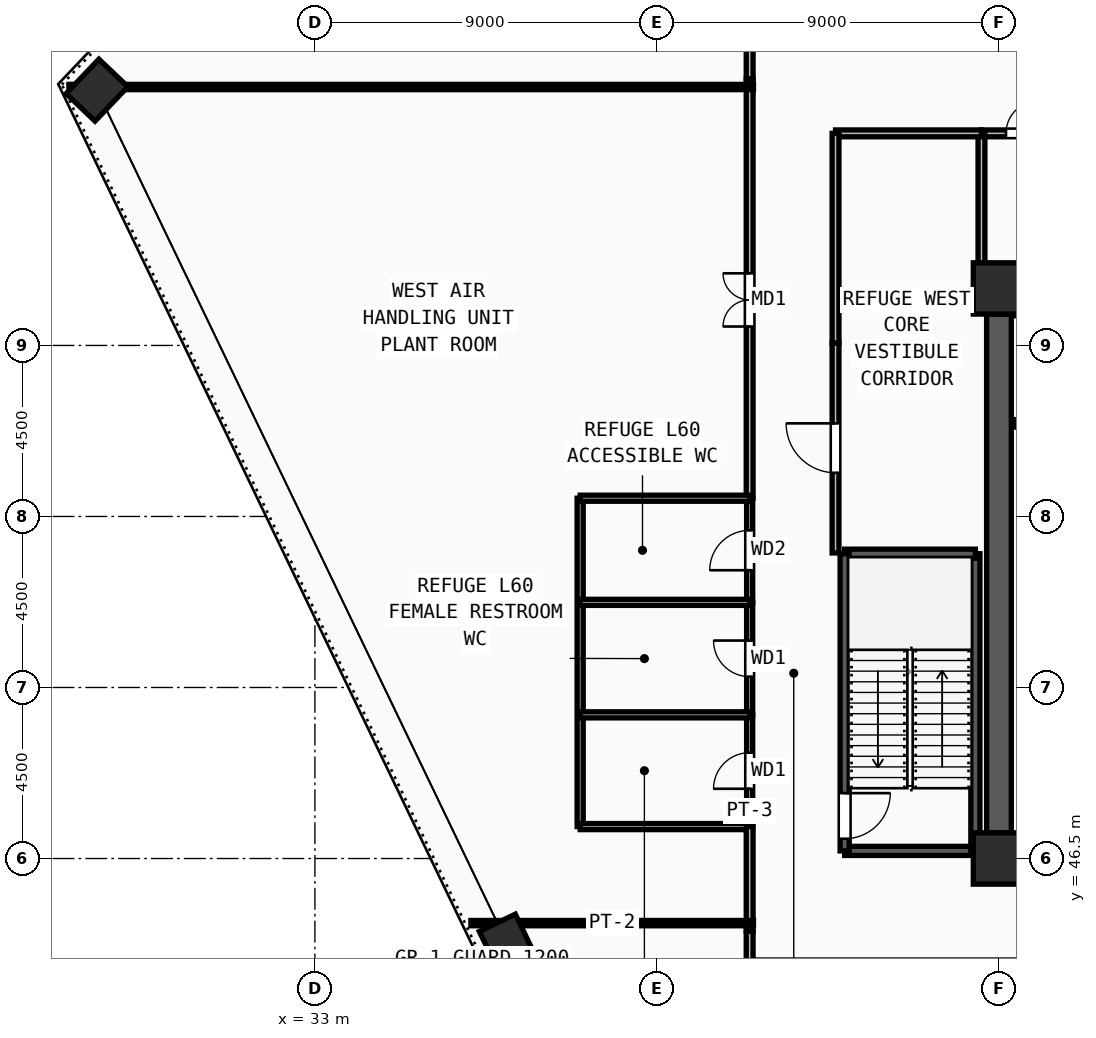
"""IFC4 building model, lengths in metres.
Left out: names, types, materials, properties, quantities, classifications, styles, units other than length and angle.
Written with IfcOpenShell. Run it as: python <this file> out.ifc"""

import sys

from ifc_helpers import new_model, si_unit, direction, frame, frame_2d, origin, origin_2d, place, context, subcontext, project, spatial, rectangle, extrude, source, transform, mapped, element, fill, save


model = new_model("IFC4")
c1 = context("Model", 3, precision=1e-05, world=origin(), true_north=direction((0.0, 1.0)))
c2 = subcontext(c1, "Body", "Model", "MODEL_VIEW")
j1 = project(units=[si_unit("LENGTHUNIT", "METRE"), si_unit("PLANEANGLEUNIT", "RADIAN")], contexts=[c1])
p1 = place(None, origin())
s1 = spatial("IfcSite", under=j1, at=p1, CompositionType="ELEMENT")
p2 = place(p1, origin())
s2 = spatial("IfcBuilding", under=s1, at=p2, CompositionType="ELEMENT")
p3 = place(p2, frame((0.0, 0.0, 231.75)))
s3 = spatial("IfcBuildingStorey", under=s2, at=p3, CompositionType="ELEMENT", Elevation=231.75)
m1 = source(origin(), c2, "Body", "SweptSolid", [
    extrude(rectangle(XDim=1.35, YDim=1.35, at=origin_2d()), origin(), (0.0, 0.0, 1.0), 4.5),
])
for number, where, z_axis, x_axis in (
    (1, (51.0, 46.5, 0.0), (0.0, 0.0, 1.0), (1.0, 0.0, 0.0)),
    (2, (51.0, 61.5, 0.0), (0.0, 0.0, 1.0), (1.0, 0.0, 0.0)),
):
    element("IfcColumn", number, at=place(p3, frame(where, z_axis=z_axis, x_axis=x_axis)), inside=s3, PredefinedType="COLUMN", context=c2, shape_type="MappedRepresentation", body=[
        mapped(m1, transform((0.0, 0.0, 0.0), x_axis=(1.0, 0.0, 0.0), y_axis=(0.0, 1.0, 0.0), z_axis=(0.0, 0.0, 1.0), scale=1.0)),
    ])
m2 = source(origin(), c2, "Body", "SweptSolid", [
    extrude(rectangle(XDim=1.25, YDim=1.05, at=origin_2d()), origin(), (0.0, 0.0, 1.0), 4.5),
])
for number, where, z_axis, x_axis in (
    (3, (38.071, 44.245, 0.0), (0.0, 0.0, 1.0), (-0.433, 0.901, 0.0)),
    (4, (27.265, 66.717, 0.0), (0.0, 0.0, 1.0), (0.689, 0.724, 0.0)),
):
    element("IfcColumn", number, at=place(p3, frame(where, z_axis=z_axis, x_axis=x_axis)), inside=s3, PredefinedType="COLUMN", context=c2, shape_type="MappedRepresentation", body=[
        mapped(m2, transform((0.0, 0.0, 0.0), x_axis=(1.0, 0.0, 0.0), y_axis=(0.0, 1.0, 0.0), z_axis=(0.0, 0.0, 1.0), scale=1.0)),
    ])
p4 = place(p3, frame((51.0, 47.175, 0.0), z_axis=(0.0, 0.0, 1.0), x_axis=(0.0, 1.0, 0.0)))
e5 = element("IfcWall", 5, at=p4, inside=s3, PredefinedType="SHEAR", context=c2, shape_type="SweptSolid", body=[
    extrude(rectangle(XDim=13.65, YDim=0.65, at=frame_2d((6.825, 0.0))), origin(), (0.0, 0.0, 1.0), 4.32),
])
p5 = place(p3, frame((46.94, 46.7, 0.0), z_axis=(0.0, 0.0, 1.0), x_axis=(1.0, 0.0, 0.0)))
e6 = element("IfcWall", 6, at=p5, inside=s3, PredefinedType="SOLIDWALL", context=c2, shape_type="SweptSolid", body=[
    extrude(rectangle(XDim=3.44, YDim=0.24, at=frame_2d((1.72, 0.0))), origin(), (0.0, 0.0, 1.0), 4.32),
])
p6 = place(p3, frame((50.38, 46.7, 0.0), z_axis=(0.0, 0.0, 1.0), x_axis=(0.0, 1.0, 0.0)))
e7 = element("IfcWall", 7, at=p6, inside=s3, PredefinedType="SOLIDWALL", context=c2, shape_type="SweptSolid", body=[
    extrude(rectangle(XDim=7.82, YDim=0.24, at=frame_2d((3.91, 0.0))), origin(), (0.0, 0.0, 1.0), 4.32),
])
p7 = place(p3, frame((50.38, 54.52, 0.0), z_axis=(0.0, 0.0, 1.0), x_axis=(-1.0, 0.0, 0.0)))
e8 = element("IfcWall", 8, at=p7, inside=s3, PredefinedType="SOLIDWALL", context=c2, shape_type="SweptSolid", body=[
    extrude(rectangle(XDim=3.44, YDim=0.24, at=frame_2d((1.72, 0.0))), origin(), (0.0, 0.0, 1.0), 4.32),
])
p8 = place(p3, frame((46.94, 54.52, 0.0), z_axis=(0.0, 0.0, 1.0), x_axis=(0.0, -1.0, 0.0)))
e9 = element("IfcWall", 9, at=p8, inside=s3, PredefinedType="SOLIDWALL", context=c2, shape_type="SweptSolid", body=[
    extrude(rectangle(XDim=7.82, YDim=0.24, at=frame_2d((3.91, 0.0))), origin(), (0.0, 0.0, 1.0), 4.32),
])
m3 = source(origin(), c2, "Body", "SweptSolid", [
    extrude(rectangle(XDim=1.2, YDim=2.2, at=frame_2d((0.6, 1.1))), frame((0.0, 0.13, 0.0), z_axis=(0.0, -1.0, 0.0), x_axis=(1.0, 0.0, 0.0)), (0.0, 0.0, 1.0), 0.26),
])
p9 = place(p8, frame((6.3, 0.0, 0.0)))
e10 = element("IfcOpeningElement", 10, at=p9, cuts=e9, PredefinedType="OPENING", context=c2, shape_type="MappedRepresentation", body=[
    mapped(m3, transform((0.0, 0.0, 0.0), x_axis=(1.0, 0.0, 0.0), y_axis=(0.0, 1.0, 0.0), z_axis=(0.0, 0.0, 1.0), scale=1.0)),
])
for number, where, z_axis, x_axis in (
    (11, (51.4, 57.95, 0.0), (0.0, 0.0, 1.0), (1.0, 0.0, 0.0)),
    (12, (53.8, 60.88, 0.0), (0.0, 0.0, 1.0), (-1.0, 0.0, 0.0)),
):
    element("IfcWall", number, at=place(p3, frame(where, z_axis=z_axis, x_axis=x_axis)), inside=s3, PredefinedType="SOLIDWALL", context=c2, shape_type="SweptSolid", body=[
        extrude(rectangle(XDim=2.4, YDim=0.2, at=frame_2d((1.2, 0.0))), origin(), (0.0, 0.0, 1.0), 4.32),
    ])
p10 = place(p3, frame((44.44, 47.34, 0.0), z_axis=(0.0, 0.0, 1.0), x_axis=(0.0, 1.0, 0.0)))
e13 = element("IfcWall", 13, at=p10, inside=s3, PredefinedType="PARTITIONING", context=c2, shape_type="SweptSolid", body=[
    extrude(rectangle(XDim=2.94, YDim=0.16, at=frame_2d((1.47, 0.0))), origin(), (0.0, 0.0, 1.0), 4.32),
])
m4 = source(origin(), c2, "Body", "SweptSolid", [
    extrude(rectangle(XDim=0.95, YDim=2.15, at=frame_2d((0.475, 1.075))), frame((0.0, 0.09, 0.0), z_axis=(0.0, -1.0, 0.0), x_axis=(1.0, 0.0, 0.0)), (0.0, 0.0, 1.0), 0.18),
])
p11 = place(p10, frame((0.995, 0.0, 0.0)))
e14 = element("IfcOpeningElement", 14, at=p11, cuts=e13, PredefinedType="OPENING", context=c2, shape_type="MappedRepresentation", body=[
    mapped(m4, transform((0.0, 0.0, 0.0), x_axis=(1.0, 0.0, 0.0), y_axis=(0.0, 1.0, 0.0), z_axis=(0.0, 0.0, 1.0), scale=1.0)),
])
p12 = place(p3, frame((44.44, 50.28, 0.0), z_axis=(0.0, 0.0, 1.0), x_axis=(0.0, 1.0, 0.0)))
e15 = element("IfcWall", 15, at=p12, inside=s3, PredefinedType="PARTITIONING", context=c2, shape_type="SweptSolid", body=[
    extrude(rectangle(XDim=2.96, YDim=0.16, at=frame_2d((1.48, 0.0))), origin(), (0.0, 0.0, 1.0), 3.955),
])
p13 = place(p12, frame((1.005, 0.0, 0.0)))
e16 = element("IfcOpeningElement", 16, at=p13, cuts=e15, PredefinedType="OPENING", context=c2, shape_type="MappedRepresentation", body=[
    mapped(m4, transform((0.0, 0.0, 0.0), x_axis=(1.0, 0.0, 0.0), y_axis=(0.0, 1.0, 0.0), z_axis=(0.0, 0.0, 1.0), scale=1.0)),
])
p14 = place(p3, frame((44.44, 53.24, 0.0), z_axis=(0.0, 0.0, 1.0), x_axis=(0.0, 1.0, 0.0)))
e17 = element("IfcWall", 17, at=p14, inside=s3, PredefinedType="PARTITIONING", context=c2, shape_type="SweptSolid", body=[
    extrude(rectangle(XDim=2.74, YDim=0.16, at=frame_2d((1.37, 0.0))), origin(), (0.0, 0.0, 1.0), 4.32),
])
m5 = source(origin(), c2, "Body", "SweptSolid", [
    extrude(rectangle(XDim=1.05, YDim=2.15, at=frame_2d((0.525, 1.075))), frame((0.0, 0.09, 0.0), z_axis=(0.0, -1.0, 0.0), x_axis=(1.0, 0.0, 0.0)), (0.0, 0.0, 1.0), 0.18),
])
p15 = place(p14, frame((0.845, 0.0, 0.0)))
e18 = element("IfcOpeningElement", 18, at=p15, cuts=e17, PredefinedType="OPENING", context=c2, shape_type="MappedRepresentation", body=[
    mapped(m5, transform((0.0, 0.0, 0.0), x_axis=(1.0, 0.0, 0.0), y_axis=(0.0, 1.0, 0.0), z_axis=(0.0, 0.0, 1.0), scale=1.0)),
])
p16 = place(p3, frame((50.54, 65.58, 0.0), z_axis=(0.0, 0.0, 1.0), x_axis=(1.0, 0.0, 0.0)))
e19 = element("IfcWall", 19, at=p16, inside=s3, PredefinedType="PARTITIONING", context=c2, shape_type="SweptSolid", body=[
    extrude(rectangle(XDim=2.14, YDim=0.18, at=frame_2d((1.07, 0.0))), origin(), (0.0, 0.0, 1.0), 4.32),
])
m6 = source(origin(), c2, "Body", "SweptSolid", [
    extrude(rectangle(XDim=0.85, YDim=2.1, at=frame_2d((0.425, 1.05))), frame((0.0, 0.1, 0.0), z_axis=(0.0, -1.0, 0.0), x_axis=(1.0, 0.0, 0.0)), (0.0, 0.0, 1.0), 0.2),
])
p17 = place(p16, frame((0.645, 0.0, 0.0)))
e20 = element("IfcOpeningElement", 20, at=p17, cuts=e19, PredefinedType="OPENING", context=c2, shape_type="MappedRepresentation", body=[
    mapped(m6, transform((0.0, 0.0, 0.0), x_axis=(1.0, 0.0, 0.0), y_axis=(0.0, 1.0, 0.0), z_axis=(0.0, 0.0, 1.0), scale=1.0)),
])
p18 = place(p3, frame((46.7, 54.54, 0.0), z_axis=(0.0, 0.0, 1.0), x_axis=(0.0, 1.0, 0.0)))
e21 = element("IfcWall", 21, at=p18, inside=s3, PredefinedType="PARTITIONING", context=c2, shape_type="SweptSolid", body=[
    extrude(rectangle(XDim=5.52, YDim=0.18, at=frame_2d((2.76, 0.0))), origin(), (0.0, 0.0, 1.0), 4.32),
])
m7 = source(origin(), c2, "Body", "SweptSolid", [
    extrude(rectangle(XDim=1.3, YDim=2.2, at=frame_2d((0.65, 1.1))), frame((0.0, 0.1, 0.0), z_axis=(0.0, -1.0, 0.0), x_axis=(1.0, 0.0, 0.0)), (0.0, 0.0, 1.0), 0.2),
])
p19 = place(p18, frame((2.11, 0.0, 0.0)))
e22 = element("IfcOpeningElement", 22, at=p19, cuts=e21, PredefinedType="OPENING", context=c2, shape_type="MappedRepresentation", body=[
    mapped(m7, transform((0.0, 0.0, 0.0), x_axis=(1.0, 0.0, 0.0), y_axis=(0.0, 1.0, 0.0), z_axis=(0.0, 0.0, 1.0), scale=1.0)),
])
p20 = place(p3, frame((44.44, 55.98, 0.0), z_axis=(0.0, 0.0, 1.0), x_axis=(0.0, 1.0, 0.0)))
e23 = element("IfcWall", 23, at=p20, inside=s3, PredefinedType="PARTITIONING", context=c2, shape_type="SweptSolid", body=[
    extrude(rectangle(XDim=11.035, YDim=0.18, at=frame_2d((5.518, 0.0))), origin(), (0.0, 0.0, 1.0), 4.32),
])
m8 = source(origin(), c2, "Body", "SweptSolid", [
    extrude(rectangle(XDim=1.4, YDim=2.25, at=frame_2d((0.7, 1.125))), frame((0.0, 0.1, 0.0), z_axis=(0.0, -1.0, 0.0), x_axis=(1.0, 0.0, 0.0)), (0.0, 0.0, 1.0), 0.2),
])
p21 = place(p20, frame((4.518, 0.0, 0.0)))
e24 = element("IfcOpeningElement", 24, at=p21, cuts=e23, PredefinedType="OPENING", context=c2, shape_type="MappedRepresentation", body=[
    mapped(m8, transform((0.0, 0.0, 0.0), x_axis=(1.0, 0.0, 0.0), y_axis=(0.0, 1.0, 0.0), z_axis=(0.0, 0.0, 1.0), scale=1.0)),
])
p22 = place(p3, frame((39.98, 47.34, 0.0), z_axis=(0.0, 0.0, 1.0), x_axis=(0.0, 1.0, 0.0)))
e25 = element("IfcWall", 25, at=p22, inside=s3, PredefinedType="PARTITIONING", context=c2, shape_type="SweptSolid", body=[
    extrude(rectangle(XDim=8.64, YDim=0.16, at=frame_2d((4.32, 0.0))), origin(), (0.0, 0.0, 1.0), 4.32),
])
for number, where, z_axis, x_axis in (
    (26, (39.98, 47.34, 0.0), (0.0, 0.0, 1.0), (1.0, 0.0, 0.0)),
    (27, (39.98, 50.28, 0.0), (0.0, 0.0, 1.0), (1.0, 0.0, 0.0)),
    (28, (39.98, 53.24, 0.0), (0.0, 0.0, 1.0), (1.0, 0.0, 0.0)),
    (29, (39.98, 55.98, 0.0), (0.0, 0.0, 1.0), (1.0, 0.0, 0.0)),
):
    element("IfcWall", number, at=place(p3, frame(where, z_axis=z_axis, x_axis=x_axis)), inside=s3, PredefinedType="PARTITIONING", context=c2, shape_type="SweptSolid", body=[
        extrude(rectangle(XDim=4.46, YDim=0.16, at=frame_2d((2.23, 0.0))), origin(), (0.0, 0.0, 1.0), 4.32),
    ])
p23 = place(p3, frame((50.54, 61.95, 0.0), z_axis=(0.0, 0.0, 1.0), x_axis=(0.0, 1.0, 0.0)))
e30 = element("IfcWall", 30, at=p23, inside=s3, PredefinedType="PARTITIONING", context=c2, shape_type="SweptSolid", body=[
    extrude(rectangle(XDim=3.63, YDim=0.18, at=frame_2d((1.815, 0.0))), origin(), (0.0, 0.0, 1.0), 4.32),
])
p24 = place(p3, frame((46.7, 65.58, 0.0), z_axis=(0.0, 0.0, 1.0), x_axis=(1.0, 0.0, 0.0)))
e31 = element("IfcWall", 31, at=p24, inside=s3, PredefinedType="PARTITIONING", context=c2, shape_type="SweptSolid", body=[
    extrude(rectangle(XDim=3.84, YDim=0.18, at=frame_2d((1.92, 0.0))), origin(), (0.0, 0.0, 1.0), 4.32),
])
p25 = place(p3, frame((46.7, 60.06, 0.0), z_axis=(0.0, 0.0, 1.0), x_axis=(0.0, 1.0, 0.0)))
e32 = element("IfcWall", 32, at=p25, inside=s3, PredefinedType="PARTITIONING", context=c2, shape_type="SweptSolid", body=[
    extrude(rectangle(XDim=5.52, YDim=0.18, at=frame_2d((2.76, 0.0))), origin(), (0.0, 0.0, 1.0), 4.32),
])
p26 = place(p3, frame((44.44, 67.015, 0.0), z_axis=(0.0, 0.0, 1.0), x_axis=(0.0, 1.0, 0.0)))
e33 = element("IfcWall", 33, at=p26, inside=s3, PredefinedType="PARTITIONING", context=c2, shape_type="SweptSolid", body=[
    extrude(rectangle(XDim=0.965, YDim=0.18, at=frame_2d((0.482, 0.0))), origin(), (0.0, 0.0, 1.0), 4.32),
])
p27 = place(p3, frame((44.44, 44.585, 0.0), z_axis=(0.0, 0.0, 1.0), x_axis=(0.0, 1.0, 0.0)))
e34 = element("IfcWall", 34, at=p27, inside=s3, PredefinedType="PARTITIONING", context=c2, shape_type="SweptSolid", body=[
    extrude(rectangle(XDim=2.755, YDim=0.18, at=frame_2d((1.377, 0.0))), origin(), (0.0, 0.0, 1.0), 4.32),
])
p28 = place(p3, frame((44.44, 43.67, 0.0), z_axis=(0.0, 0.0, 1.0), x_axis=(0.0, 1.0, 0.0)))
e35 = element("IfcWall", 35, at=p28, inside=s3, PredefinedType="PARTITIONING", context=c2, shape_type="SweptSolid", body=[
    extrude(rectangle(XDim=0.915, YDim=0.18, at=frame_2d((0.458, 0.0))), origin(), (0.0, 0.0, 1.0), 4.32),
])
p29 = place(p3, frame((44.54, 44.8, 0.0), z_axis=(0.0, 0.0, 1.0), x_axis=(-1.0, 0.0, 0.0)))
e36 = element("IfcWall", 36, at=p29, inside=s3, PredefinedType="PARTITIONING", context=c2, shape_type="SweptSolid", body=[
    extrude(rectangle(XDim=7.435, YDim=0.14, at=frame_2d((3.718, 0.0))), origin(), (0.0, 0.0, 1.0), 4.32),
])
p30 = place(p3, frame((44.54, 66.8, 0.0), z_axis=(0.0, 0.0, 1.0), x_axis=(-1.0, 0.0, 0.0)))
e37 = element("IfcWall", 37, at=p30, inside=s3, PredefinedType="PARTITIONING", context=c2, shape_type="SweptSolid", body=[
    extrude(rectangle(XDim=18.013, YDim=0.14, at=frame_2d((9.006, 0.0))), origin(), (0.0, 0.0, 1.0), 4.32),
])
m9 = source(origin(), c2, "Body", "SweptSolid", [
    extrude(rectangle(XDim=1.2, YDim=2.2, at=frame_2d((0.6, 1.1))), frame((0.0, 0.025, 0.0), z_axis=(0.0, -1.0, 0.0), x_axis=(1.0, 0.0, 0.0)), (0.0, 0.0, 1.0), 0.05),
])
p31 = place(p9, origin())
e38 = element("IfcDoor", 38, at=p31, inside=s3, OperationType="SINGLE_SWING_LEFT", PredefinedType="DOOR", context=c2, shape_type="MappedRepresentation", body=[
    mapped(m9, transform((0.0, 0.0, 0.0), x_axis=(1.0, 0.0, 0.0), y_axis=(0.0, 1.0, 0.0), z_axis=(0.0, 0.0, 1.0), scale=1.0)),
])
fill(e10, e38)
m10 = source(origin(), c2, "Body", "SweptSolid", [
    extrude(rectangle(XDim=0.95, YDim=2.15, at=frame_2d((0.475, 1.075))), frame((0.0, 0.025, 0.0), z_axis=(0.0, -1.0, 0.0), x_axis=(1.0, 0.0, 0.0)), (0.0, 0.0, 1.0), 0.05),
])
p32 = place(p11, origin())
e39 = element("IfcDoor", 39, at=p32, inside=s3, OperationType="SINGLE_SWING_LEFT", PredefinedType="DOOR", context=c2, shape_type="MappedRepresentation", body=[
    mapped(m10, transform((0.0, 0.0, 0.0), x_axis=(1.0, 0.0, 0.0), y_axis=(0.0, 1.0, 0.0), z_axis=(0.0, 0.0, 1.0), scale=1.0)),
])
fill(e14, e39)
p33 = place(p13, origin())
e40 = element("IfcDoor", 40, at=p33, inside=s3, OperationType="SINGLE_SWING_RIGHT", PredefinedType="DOOR", context=c2, shape_type="MappedRepresentation", body=[
    mapped(m10, transform((0.0, 0.0, 0.0), x_axis=(1.0, 0.0, 0.0), y_axis=(0.0, 1.0, 0.0), z_axis=(0.0, 0.0, 1.0), scale=1.0)),
])
fill(e16, e40)
m11 = source(origin(), c2, "Body", "SweptSolid", [
    extrude(rectangle(XDim=1.05, YDim=2.15, at=frame_2d((0.525, 1.075))), frame((0.0, 0.025, 0.0), z_axis=(0.0, -1.0, 0.0), x_axis=(1.0, 0.0, 0.0)), (0.0, 0.0, 1.0), 0.05),
])
p34 = place(p15, origin())
e41 = element("IfcDoor", 41, at=p34, inside=s3, OperationType="SINGLE_SWING_LEFT", PredefinedType="DOOR", context=c2, shape_type="MappedRepresentation", body=[
    mapped(m11, transform((0.0, 0.0, 0.0), x_axis=(1.0, 0.0, 0.0), y_axis=(0.0, 1.0, 0.0), z_axis=(0.0, 0.0, 1.0), scale=1.0)),
])
fill(e18, e41)
m12 = source(origin(), c2, "Body", "SweptSolid", [
    extrude(rectangle(XDim=0.85, YDim=2.1, at=frame_2d((0.425, 1.05))), frame((0.0, 0.025, 0.0), z_axis=(0.0, -1.0, 0.0), x_axis=(1.0, 0.0, 0.0)), (0.0, 0.0, 1.0), 0.05),
])
p35 = place(p17, origin())
e42 = element("IfcDoor", 42, at=p35, inside=s3, OperationType="SINGLE_SWING_RIGHT", PredefinedType="DOOR", context=c2, shape_type="MappedRepresentation", body=[
    mapped(m12, transform((0.0, 0.0, 0.0), x_axis=(1.0, 0.0, 0.0), y_axis=(0.0, 1.0, 0.0), z_axis=(0.0, 0.0, 1.0), scale=1.0)),
])
fill(e20, e42)
m13 = source(origin(), c2, "Body", "SweptSolid", [
    extrude(rectangle(XDim=1.3, YDim=2.2, at=frame_2d((0.65, 1.1))), frame((0.0, 0.025, 0.0), z_axis=(0.0, -1.0, 0.0), x_axis=(1.0, 0.0, 0.0)), (0.0, 0.0, 1.0), 0.05),
])
p36 = place(p19, origin())
e43 = element("IfcDoor", 43, at=p36, inside=s3, OperationType="SINGLE_SWING_RIGHT", PredefinedType="DOOR", context=c2, shape_type="MappedRepresentation", body=[
    mapped(m13, transform((0.0, 0.0, 0.0), x_axis=(1.0, 0.0, 0.0), y_axis=(0.0, 1.0, 0.0), z_axis=(0.0, 0.0, 1.0), scale=1.0)),
])
fill(e22, e43)
m14 = source(origin(), c2, "Body", "SweptSolid", [
    extrude(rectangle(XDim=1.4, YDim=2.25, at=frame_2d((0.7, 1.125))), frame((0.0, 0.025, 0.0), z_axis=(0.0, -1.0, 0.0), x_axis=(1.0, 0.0, 0.0)), (0.0, 0.0, 1.0), 0.05),
])
p37 = place(p21, origin())
e44 = element("IfcDoor", 44, at=p37, inside=s3, OperationType="DOUBLE_DOOR_SINGLE_SWING", PredefinedType="DOOR", context=c2, shape_type="MappedRepresentation", body=[
    mapped(m14, transform((0.0, 0.0, 0.0), x_axis=(1.0, 0.0, 0.0), y_axis=(0.0, 1.0, 0.0), z_axis=(0.0, 0.0, 1.0), scale=1.0)),
])
fill(e24, e44)
save(model, sys.argv[1])
